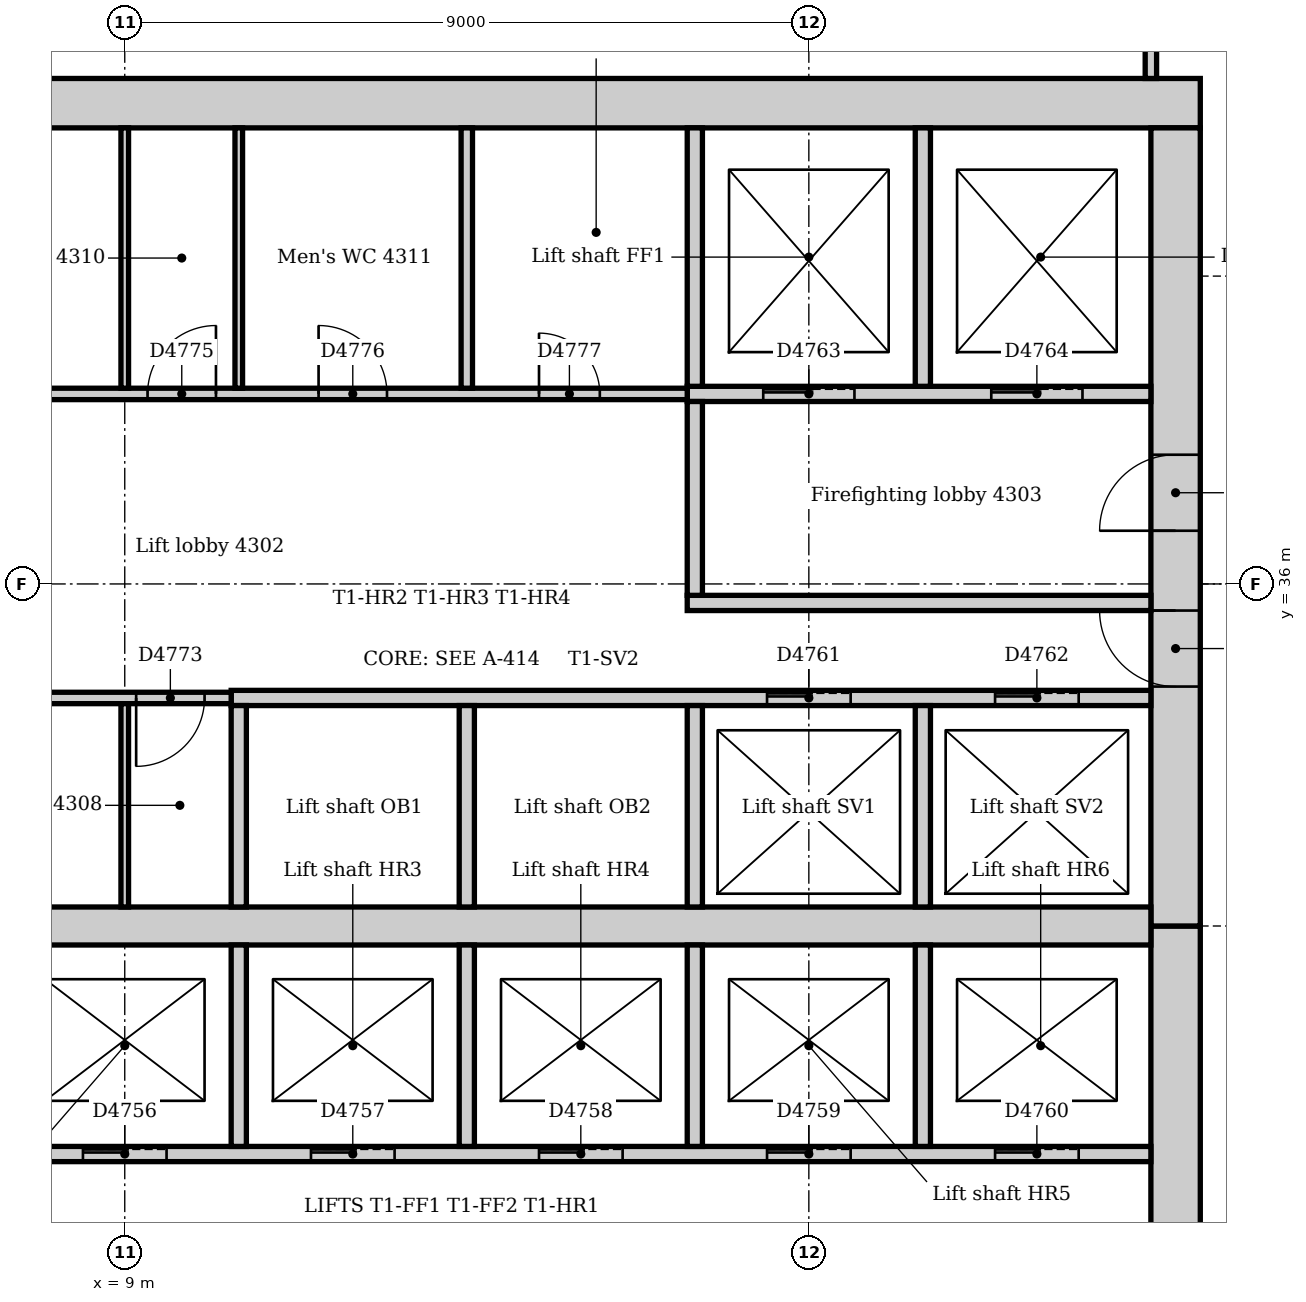
"""IFC4 building model, lengths in metres.
Left out: names, types, materials, properties, quantities, classifications, styles, units other than length and angle.
Written with IfcOpenShell. Run it as: python <this file> out.ifc"""

import sys

from ifc_helpers import new_model, si_unit, direction, frame, frame_2d, origin, place, context, subcontext, project, spatial, rectangle, extrude, element, fill, save


model = new_model("IFC4")
c1 = context("Model", 3, precision=1e-05, world=origin(), true_north=direction((0.0, 1.0)))
c2 = subcontext(c1, "Body", "Model", "MODEL_VIEW")
j1 = project(units=[si_unit("LENGTHUNIT", "METRE"), si_unit("PLANEANGLEUNIT", "RADIAN")], contexts=[c1])
p1 = place(None, origin())
s1 = spatial("IfcSite", under=j1, at=p1, CompositionType="ELEMENT")
p2 = place(p1, origin())
s2 = spatial("IfcBuilding", under=s1, at=p2, CompositionType="ELEMENT")
p3 = place(p2, frame((0.0, 0.0, 181.0)))
s3 = spatial("IfcBuildingStorey", under=s2, at=p3, CompositionType="ELEMENT", Elevation=181.0)
p4 = place(p3, frame((23.15, 42.325, 0.0), z_axis=(0.0, 0.0, 1.0), x_axis=(-1.0, 0.0, 0.0)))
e1 = element("IfcWall", 1, at=p4, inside=s3, PredefinedType="SOLIDWALL", context=c2, shape_type="SweptSolid", body=[
    extrude(rectangle(XDim=19.25, YDim=0.65, at=frame_2d((9.625, 0.0))), origin(), (0.0, 0.0, 1.0), 4.0),
])
p5 = place(p3, frame((22.825, 21.0, 0.0), z_axis=(0.0, 0.0, 1.0), x_axis=(0.0, 1.0, 0.0)))
e2 = element("IfcWall", 2, at=p5, inside=s3, PredefinedType="SOLIDWALL", context=c2, shape_type="SweptSolid", body=[
    extrude(rectangle(XDim=10.5, YDim=0.65, at=frame_2d((5.25, 0.0))), origin(), (0.0, 0.0, 1.0), 4.0),
])
p6 = place(p5, frame((4.35, 0.0, 0.0)))
e3 = element("IfcOpeningElement", 3, at=p6, cuts=e2, PredefinedType="OPENING", context=c2, shape_type="SweptSolid", body=[
    extrude(rectangle(XDim=1.8, YDim=2.1, at=frame_2d((0.9, 1.05))), frame((0.0, 0.335, 0.0), z_axis=(0.0, -1.0, 0.0), x_axis=(1.0, 0.0, 0.0)), (0.0, 0.0, 1.0), 0.67),
])
p7 = place(p3, frame((22.825, 31.5, 0.0), z_axis=(0.0, 0.0, 1.0), x_axis=(0.0, 1.0, 0.0)))
e4 = element("IfcWall", 4, at=p7, inside=s3, PredefinedType="SOLIDWALL", context=c2, shape_type="SweptSolid", body=[
    extrude(rectangle(XDim=10.5, YDim=0.65, at=frame_2d((5.25, 0.0))), origin(), (0.0, 0.0, 1.0), 4.0),
])
p8 = place(p7, frame((3.15, 0.0, 0.0)))
e5 = element("IfcOpeningElement", 5, at=p8, cuts=e4, PredefinedType="OPENING", context=c2, shape_type="SweptSolid", body=[
    extrude(rectangle(XDim=1.0, YDim=2.1, at=frame_2d((0.5, 1.05))), frame((0.0, 0.335, 0.0), z_axis=(0.0, -1.0, 0.0), x_axis=(1.0, 0.0, 0.0)), (0.0, 0.0, 1.0), 0.67),
])
p9 = place(p7, frame((5.2, 0.0, 0.0)))
e6 = element("IfcOpeningElement", 6, at=p9, cuts=e4, PredefinedType="OPENING", context=c2, shape_type="SweptSolid", body=[
    extrude(rectangle(XDim=1.0, YDim=2.1, at=frame_2d((0.5, 1.05))), frame((0.0, 0.335, 0.0), z_axis=(0.0, -1.0, 0.0), x_axis=(1.0, 0.0, 0.0)), (0.0, 0.0, 1.0), 0.67),
])
p10 = place(p3, frame((4.5, 31.5, 0.0), z_axis=(0.0, 0.0, 1.0), x_axis=(1.0, 0.0, 0.0)))
e7 = element("IfcWall", 7, at=p10, inside=s3, PredefinedType="SOLIDWALL", context=c2, shape_type="SweptSolid", body=[
    extrude(rectangle(XDim=18.0, YDim=0.5, at=frame_2d((9.0, 0.0))), origin(), (0.0, 0.0, 1.0), 4.0),
])
p11 = place(p3, frame((16.4, 35.75, 0.0), z_axis=(0.0, 0.0, 1.0), x_axis=(1.0, 0.0, 0.0)))
e8 = element("IfcWall", 8, at=p11, inside=s3, PredefinedType="PARTITIONING", context=c2, shape_type="SweptSolid", body=[
    extrude(rectangle(XDim=6.1, YDim=0.2, at=frame_2d((3.05, 0.0))), origin(), (0.0, 0.0, 1.0), 3.85),
])
p12 = place(p3, frame((16.4, 38.5, 0.0), z_axis=(0.0, 0.0, 1.0), x_axis=(1.0, 0.0, 0.0)))
e9 = element("IfcWall", 9, at=p12, inside=s3, PredefinedType="PARTITIONING", context=c2, shape_type="SweptSolid", body=[
    extrude(rectangle(XDim=6.1, YDim=0.2, at=frame_2d((3.05, 0.0))), origin(), (0.0, 0.0, 1.0), 3.85),
])
p13 = place(p12, frame((1.0, 0.0, 0.0)))
e10 = element("IfcOpeningElement", 10, at=p13, cuts=e9, PredefinedType="OPENING", context=c2, shape_type="SweptSolid", body=[
    extrude(rectangle(XDim=1.2, YDim=2.1, at=frame_2d((0.6, 1.05))), frame((0.0, 0.11, 0.0), z_axis=(0.0, -1.0, 0.0), x_axis=(1.0, 0.0, 0.0)), (0.0, 0.0, 1.0), 0.22),
])
p14 = place(p12, frame((4.0, 0.0, 0.0)))
e11 = element("IfcOpeningElement", 11, at=p14, cuts=e9, PredefinedType="OPENING", context=c2, shape_type="SweptSolid", body=[
    extrude(rectangle(XDim=1.2, YDim=2.1, at=frame_2d((0.6, 1.05))), frame((0.0, 0.11, 0.0), z_axis=(0.0, -1.0, 0.0), x_axis=(1.0, 0.0, 0.0)), (0.0, 0.0, 1.0), 0.22),
])
p15 = place(p3, frame((16.5, 35.85, 0.0), z_axis=(0.0, 0.0, 1.0), x_axis=(0.0, 1.0, 0.0)))
e12 = element("IfcWall", 12, at=p15, inside=s3, PredefinedType="PARTITIONING", context=c2, shape_type="SweptSolid", body=[
    extrude(rectangle(XDim=2.55, YDim=0.2, at=frame_2d((1.275, 0.0))), origin(), (0.0, 0.0, 1.0), 3.85),
])
p16 = place(p3, frame((4.5, 28.5, 0.0), z_axis=(0.0, 0.0, 1.0), x_axis=(1.0, 0.0, 0.0)))
e13 = element("IfcWall", 13, at=p16, inside=s3, PredefinedType="PARTITIONING", context=c2, shape_type="SweptSolid", body=[
    extrude(rectangle(XDim=18.0, YDim=0.2, at=frame_2d((9.0, 0.0))), origin(), (0.0, 0.0, 1.0), 3.85),
])
p17 = place(p16, frame((0.95, 0.0, 0.0)))
e14 = element("IfcOpeningElement", 14, at=p17, cuts=e13, PredefinedType="OPENING", context=c2, shape_type="SweptSolid", body=[
    extrude(rectangle(XDim=1.1, YDim=2.1, at=frame_2d((0.55, 1.05))), frame((0.0, 0.11, 0.0), z_axis=(0.0, -1.0, 0.0), x_axis=(1.0, 0.0, 0.0)), (0.0, 0.0, 1.0), 0.22),
])
p18 = place(p16, frame((3.95, 0.0, 0.0)))
e15 = element("IfcOpeningElement", 15, at=p18, cuts=e13, PredefinedType="OPENING", context=c2, shape_type="SweptSolid", body=[
    extrude(rectangle(XDim=1.1, YDim=2.1, at=frame_2d((0.55, 1.05))), frame((0.0, 0.11, 0.0), z_axis=(0.0, -1.0, 0.0), x_axis=(1.0, 0.0, 0.0)), (0.0, 0.0, 1.0), 0.22),
])
p19 = place(p16, frame((6.95, 0.0, 0.0)))
e16 = element("IfcOpeningElement", 16, at=p19, cuts=e13, PredefinedType="OPENING", context=c2, shape_type="SweptSolid", body=[
    extrude(rectangle(XDim=1.1, YDim=2.1, at=frame_2d((0.55, 1.05))), frame((0.0, 0.11, 0.0), z_axis=(0.0, -1.0, 0.0), x_axis=(1.0, 0.0, 0.0)), (0.0, 0.0, 1.0), 0.22),
])
p20 = place(p16, frame((9.95, 0.0, 0.0)))
e17 = element("IfcOpeningElement", 17, at=p20, cuts=e13, PredefinedType="OPENING", context=c2, shape_type="SweptSolid", body=[
    extrude(rectangle(XDim=1.1, YDim=2.1, at=frame_2d((0.55, 1.05))), frame((0.0, 0.11, 0.0), z_axis=(0.0, -1.0, 0.0), x_axis=(1.0, 0.0, 0.0)), (0.0, 0.0, 1.0), 0.22),
])
p21 = place(p16, frame((12.95, 0.0, 0.0)))
e18 = element("IfcOpeningElement", 18, at=p21, cuts=e13, PredefinedType="OPENING", context=c2, shape_type="SweptSolid", body=[
    extrude(rectangle(XDim=1.1, YDim=2.1, at=frame_2d((0.55, 1.05))), frame((0.0, 0.11, 0.0), z_axis=(0.0, -1.0, 0.0), x_axis=(1.0, 0.0, 0.0)), (0.0, 0.0, 1.0), 0.22),
])
p22 = place(p16, frame((15.95, 0.0, 0.0)))
e19 = element("IfcOpeningElement", 19, at=p22, cuts=e13, PredefinedType="OPENING", context=c2, shape_type="SweptSolid", body=[
    extrude(rectangle(XDim=1.1, YDim=2.1, at=frame_2d((0.55, 1.05))), frame((0.0, 0.11, 0.0), z_axis=(0.0, -1.0, 0.0), x_axis=(1.0, 0.0, 0.0)), (0.0, 0.0, 1.0), 0.22),
])
p23 = place(p3, frame((10.4, 34.5, 0.0), z_axis=(0.0, 0.0, 1.0), x_axis=(1.0, 0.0, 0.0)))
e20 = element("IfcWall", 20, at=p23, inside=s3, PredefinedType="PARTITIONING", context=c2, shape_type="SweptSolid", body=[
    extrude(rectangle(XDim=12.1, YDim=0.2, at=frame_2d((6.05, 0.0))), origin(), (0.0, 0.0, 1.0), 3.85),
])
p24 = place(p23, frame((7.05, 0.0, 0.0)))
e21 = element("IfcOpeningElement", 21, at=p24, cuts=e20, PredefinedType="OPENING", context=c2, shape_type="SweptSolid", body=[
    extrude(rectangle(XDim=1.1, YDim=2.1, at=frame_2d((0.55, 1.05))), frame((0.0, 0.11, 0.0), z_axis=(0.0, -1.0, 0.0), x_axis=(1.0, 0.0, 0.0)), (0.0, 0.0, 1.0), 0.22),
])
p25 = place(p23, frame((10.05, 0.0, 0.0)))
e22 = element("IfcOpeningElement", 22, at=p25, cuts=e20, PredefinedType="OPENING", context=c2, shape_type="SweptSolid", body=[
    extrude(rectangle(XDim=1.1, YDim=2.1, at=frame_2d((0.55, 1.05))), frame((0.0, 0.11, 0.0), z_axis=(0.0, -1.0, 0.0), x_axis=(1.0, 0.0, 0.0)), (0.0, 0.0, 1.0), 0.22),
])
for number, where, z_axis, x_axis in (
    (23, (10.5, 28.6, 0.0), (0.0, 0.0, 1.0), (0.0, 1.0, 0.0)),
    (24, (10.5, 31.75, 0.0), (0.0, 0.0, 1.0), (0.0, 1.0, 0.0)),
    (25, (13.5, 28.6, 0.0), (0.0, 0.0, 1.0), (0.0, 1.0, 0.0)),
    (26, (13.5, 31.75, 0.0), (0.0, 0.0, 1.0), (0.0, 1.0, 0.0)),
    (27, (16.5, 28.6, 0.0), (0.0, 0.0, 1.0), (0.0, 1.0, 0.0)),
    (28, (16.5, 31.75, 0.0), (0.0, 0.0, 1.0), (0.0, 1.0, 0.0)),
    (29, (19.5, 28.6, 0.0), (0.0, 0.0, 1.0), (0.0, 1.0, 0.0)),
    (30, (19.5, 31.75, 0.0), (0.0, 0.0, 1.0), (0.0, 1.0, 0.0)),
):
    element("IfcWall", number, at=place(p3, frame(where, z_axis=z_axis, x_axis=x_axis)), inside=s3, PredefinedType="PARTITIONING", context=c2, shape_type="SweptSolid", body=[
        extrude(rectangle(XDim=2.65, YDim=0.2, at=frame_2d((1.325, 0.0))), origin(), (0.0, 0.0, 1.0), 3.85),
    ])
for number, where, z_axis, x_axis in (
    (31, (16.5, 38.6, 0.0), (0.0, 0.0, 1.0), (0.0, 1.0, 0.0)),
    (32, (19.5, 38.6, 0.0), (0.0, 0.0, 1.0), (0.0, 1.0, 0.0)),
):
    element("IfcWall", number, at=place(p3, frame(where, z_axis=z_axis, x_axis=x_axis)), inside=s3, PredefinedType="PARTITIONING", context=c2, shape_type="SweptSolid", body=[
        extrude(rectangle(XDim=3.4, YDim=0.2, at=frame_2d((1.7, 0.0))), origin(), (0.0, 0.0, 1.0), 3.85),
    ])
p26 = place(p3, frame((4.5, 38.5, 0.0), z_axis=(0.0, 0.0, 1.0), x_axis=(1.0, 0.0, 0.0)))
e33 = element("IfcWall", 33, at=p26, inside=s3, PredefinedType="PARTITIONING", context=c2, shape_type="SweptSolid", body=[
    extrude(rectangle(XDim=11.9, YDim=0.15, at=frame_2d((5.95, 0.0))), origin(), (0.0, 0.0, 1.0), 3.85),
])
p27 = place(p26, frame((1.85, 0.0, 0.0)))
e34 = element("IfcOpeningElement", 34, at=p27, cuts=e33, PredefinedType="OPENING", context=c2, shape_type="SweptSolid", body=[
    extrude(rectangle(XDim=0.9, YDim=2.1, at=frame_2d((0.45, 1.05))), frame((0.0, 0.085, 0.0), z_axis=(0.0, -1.0, 0.0), x_axis=(1.0, 0.0, 0.0)), (0.0, 0.0, 1.0), 0.17),
])
p28 = place(p26, frame((4.8, 0.0, 0.0)))
e35 = element("IfcOpeningElement", 35, at=p28, cuts=e33, PredefinedType="OPENING", context=c2, shape_type="SweptSolid", body=[
    extrude(rectangle(XDim=0.9, YDim=2.1, at=frame_2d((0.45, 1.05))), frame((0.0, 0.085, 0.0), z_axis=(0.0, -1.0, 0.0), x_axis=(1.0, 0.0, 0.0)), (0.0, 0.0, 1.0), 0.17),
])
p29 = place(p26, frame((7.05, 0.0, 0.0)))
e36 = element("IfcOpeningElement", 36, at=p29, cuts=e33, PredefinedType="OPENING", context=c2, shape_type="SweptSolid", body=[
    extrude(rectangle(XDim=0.9, YDim=2.1, at=frame_2d((0.45, 1.05))), frame((0.0, 0.085, 0.0), z_axis=(0.0, -1.0, 0.0), x_axis=(1.0, 0.0, 0.0)), (0.0, 0.0, 1.0), 0.17),
])
p30 = place(p26, frame((9.95, 0.0, 0.0)))
e37 = element("IfcOpeningElement", 37, at=p30, cuts=e33, PredefinedType="OPENING", context=c2, shape_type="SweptSolid", body=[
    extrude(rectangle(XDim=0.8, YDim=2.1, at=frame_2d((0.4, 1.05))), frame((0.0, 0.085, 0.0), z_axis=(0.0, -1.0, 0.0), x_axis=(1.0, 0.0, 0.0)), (0.0, 0.0, 1.0), 0.17),
])
p31 = place(p3, frame((4.5, 34.5, 0.0), z_axis=(0.0, 0.0, 1.0), x_axis=(1.0, 0.0, 0.0)))
e38 = element("IfcWall", 38, at=p31, inside=s3, PredefinedType="PARTITIONING", context=c2, shape_type="SweptSolid", body=[
    extrude(rectangle(XDim=5.9, YDim=0.15, at=frame_2d((2.95, 0.0))), origin(), (0.0, 0.0, 1.0), 3.85),
])
p32 = place(p31, frame((1.85, 0.0, 0.0)))
e39 = element("IfcOpeningElement", 39, at=p32, cuts=e38, PredefinedType="OPENING", context=c2, shape_type="SweptSolid", body=[
    extrude(rectangle(XDim=0.9, YDim=2.1, at=frame_2d((0.45, 1.05))), frame((0.0, 0.085, 0.0), z_axis=(0.0, -1.0, 0.0), x_axis=(1.0, 0.0, 0.0)), (0.0, 0.0, 1.0), 0.17),
])
p33 = place(p31, frame((4.65, 0.0, 0.0)))
e40 = element("IfcOpeningElement", 40, at=p33, cuts=e38, PredefinedType="OPENING", context=c2, shape_type="SweptSolid", body=[
    extrude(rectangle(XDim=0.9, YDim=2.1, at=frame_2d((0.45, 1.05))), frame((0.0, 0.085, 0.0), z_axis=(0.0, -1.0, 0.0), x_axis=(1.0, 0.0, 0.0)), (0.0, 0.0, 1.0), 0.17),
])
p34 = place(p3, frame((22.5, 42.65, 0.0), z_axis=(0.0, 0.0, 1.0), x_axis=(0.0, 1.0, 0.0)))
e41 = element("IfcWall", 41, at=p34, inside=s3, PredefinedType="PARTITIONING", context=c2, shape_type="SweptSolid", body=[
    extrude(rectangle(XDim=1.825, YDim=0.15, at=frame_2d((0.912, 0.0))), origin(), (0.0, 0.0, 1.0), 3.85),
])
p35 = place(p3, frame((13.5, 38.575, 0.0), z_axis=(0.0, 0.0, 1.0), x_axis=(0.0, 1.0, 0.0)))
e42 = element("IfcWall", 42, at=p35, inside=s3, PredefinedType="PARTITIONING", context=c2, shape_type="SweptSolid", body=[
    extrude(rectangle(XDim=3.425, YDim=0.15, at=frame_2d((1.712, 0.0))), origin(), (0.0, 0.0, 1.0), 3.85),
])
for number, where, z_axis, x_axis in (
    (43, (9.0, 38.575, 0.0), (0.0, 0.0, 1.0), (0.0, 1.0, 0.0)),
    (44, (10.5, 38.575, 0.0), (0.0, 0.0, 1.0), (0.0, 1.0, 0.0)),
):
    element("IfcWall", number, at=place(p3, frame(where, z_axis=z_axis, x_axis=x_axis)), inside=s3, PredefinedType="PARTITIONING", context=c2, shape_type="SweptSolid", body=[
        extrude(rectangle(XDim=3.425, YDim=0.1, at=frame_2d((1.712, 0.0))), origin(), (0.0, 0.0, 1.0), 3.85),
    ])
p36 = place(p3, frame((9.0, 31.75, 0.0), z_axis=(0.0, 0.0, 1.0), x_axis=(0.0, 1.0, 0.0)))
e45 = element("IfcWall", 45, at=p36, inside=s3, PredefinedType="PARTITIONING", context=c2, shape_type="SweptSolid", body=[
    extrude(rectangle(XDim=2.675, YDim=0.1, at=frame_2d((1.337, 0.0))), origin(), (0.0, 0.0, 1.0), 3.85),
])
p37 = place(p18, origin())
e46 = element("IfcDoor", 46, at=p37, inside=s3, OperationType="SLIDING_TO_LEFT", PredefinedType="DOOR", context=c2, shape_type="SweptSolid", body=[
    extrude(rectangle(XDim=1.1, YDim=2.1, at=frame_2d((0.55, 1.05))), frame((0.0, 0.025, 0.0), z_axis=(0.0, -1.0, 0.0), x_axis=(1.0, 0.0, 0.0)), (0.0, 0.0, 1.0), 0.05),
])
fill(e15, e46)
p38 = place(p19, origin())
e47 = element("IfcDoor", 47, at=p38, inside=s3, OperationType="SLIDING_TO_LEFT", PredefinedType="DOOR", context=c2, shape_type="SweptSolid", body=[
    extrude(rectangle(XDim=1.1, YDim=2.1, at=frame_2d((0.55, 1.05))), frame((0.0, 0.025, 0.0), z_axis=(0.0, -1.0, 0.0), x_axis=(1.0, 0.0, 0.0)), (0.0, 0.0, 1.0), 0.05),
])
fill(e16, e47)
p39 = place(p20, origin())
e48 = element("IfcDoor", 48, at=p39, inside=s3, OperationType="SLIDING_TO_LEFT", PredefinedType="DOOR", context=c2, shape_type="SweptSolid", body=[
    extrude(rectangle(XDim=1.1, YDim=2.1, at=frame_2d((0.55, 1.05))), frame((0.0, 0.025, 0.0), z_axis=(0.0, -1.0, 0.0), x_axis=(1.0, 0.0, 0.0)), (0.0, 0.0, 1.0), 0.05),
])
fill(e17, e48)
p40 = place(p21, origin())
e49 = element("IfcDoor", 49, at=p40, inside=s3, OperationType="SLIDING_TO_LEFT", PredefinedType="DOOR", context=c2, shape_type="SweptSolid", body=[
    extrude(rectangle(XDim=1.1, YDim=2.1, at=frame_2d((0.55, 1.05))), frame((0.0, 0.025, 0.0), z_axis=(0.0, -1.0, 0.0), x_axis=(1.0, 0.0, 0.0)), (0.0, 0.0, 1.0), 0.05),
])
fill(e18, e49)
p41 = place(p22, origin())
e50 = element("IfcDoor", 50, at=p41, inside=s3, OperationType="SLIDING_TO_LEFT", PredefinedType="DOOR", context=c2, shape_type="SweptSolid", body=[
    extrude(rectangle(XDim=1.1, YDim=2.1, at=frame_2d((0.55, 1.05))), frame((0.0, 0.025, 0.0), z_axis=(0.0, -1.0, 0.0), x_axis=(1.0, 0.0, 0.0)), (0.0, 0.0, 1.0), 0.05),
])
fill(e19, e50)
p42 = place(p24, origin())
e51 = element("IfcDoor", 51, at=p42, inside=s3, OperationType="SLIDING_TO_LEFT", PredefinedType="DOOR", context=c2, shape_type="SweptSolid", body=[
    extrude(rectangle(XDim=1.1, YDim=2.1, at=frame_2d((0.55, 1.05))), frame((0.0, 0.025, 0.0), z_axis=(0.0, -1.0, 0.0), x_axis=(1.0, 0.0, 0.0)), (0.0, 0.0, 1.0), 0.05),
])
fill(e21, e51)
p43 = place(p25, origin())
e52 = element("IfcDoor", 52, at=p43, inside=s3, OperationType="SLIDING_TO_LEFT", PredefinedType="DOOR", context=c2, shape_type="SweptSolid", body=[
    extrude(rectangle(XDim=1.1, YDim=2.1, at=frame_2d((0.55, 1.05))), frame((0.0, 0.025, 0.0), z_axis=(0.0, -1.0, 0.0), x_axis=(1.0, 0.0, 0.0)), (0.0, 0.0, 1.0), 0.05),
])
fill(e22, e52)
p44 = place(p13, origin())
e53 = element("IfcDoor", 53, at=p44, inside=s3, OperationType="SLIDING_TO_LEFT", PredefinedType="DOOR", context=c2, shape_type="SweptSolid", body=[
    extrude(rectangle(XDim=1.2, YDim=2.1, at=frame_2d((0.6, 1.05))), frame((0.0, 0.025, 0.0), z_axis=(0.0, -1.0, 0.0), x_axis=(1.0, 0.0, 0.0)), (0.0, 0.0, 1.0), 0.05),
])
fill(e10, e53)
p45 = place(p14, origin())
e54 = element("IfcDoor", 54, at=p45, inside=s3, OperationType="SLIDING_TO_LEFT", PredefinedType="DOOR", context=c2, shape_type="SweptSolid", body=[
    extrude(rectangle(XDim=1.2, YDim=2.1, at=frame_2d((0.6, 1.05))), frame((0.0, 0.025, 0.0), z_axis=(0.0, -1.0, 0.0), x_axis=(1.0, 0.0, 0.0)), (0.0, 0.0, 1.0), 0.05),
])
fill(e11, e54)
p46 = place(p8, origin())
e55 = element("IfcDoor", 55, at=p46, inside=s3, OperationType="SINGLE_SWING_RIGHT", PredefinedType="DOOR", context=c2, shape_type="SweptSolid", body=[
    extrude(rectangle(XDim=1.0, YDim=2.1, at=frame_2d((0.5, 1.05))), frame((0.0, 0.025, 0.0), z_axis=(0.0, -1.0, 0.0), x_axis=(1.0, 0.0, 0.0)), (0.0, 0.0, 1.0), 0.05),
])
fill(e5, e55)
p47 = place(p9, origin())
e56 = element("IfcDoor", 56, at=p47, inside=s3, OperationType="SINGLE_SWING_LEFT", PredefinedType="DOOR", context=c2, shape_type="SweptSolid", body=[
    extrude(rectangle(XDim=1.0, YDim=2.1, at=frame_2d((0.5, 1.05))), frame((0.0, 0.025, 0.0), z_axis=(0.0, -1.0, 0.0), x_axis=(1.0, 0.0, 0.0)), (0.0, 0.0, 1.0), 0.05),
])
fill(e6, e56)
p48 = place(p33, frame((0.9, 0.0, 0.0), z_axis=(0.0, 0.0, 1.0), x_axis=(-1.0, 0.0, 0.0)))
e57 = element("IfcDoor", 57, at=p48, inside=s3, OperationType="SINGLE_SWING_RIGHT", PredefinedType="DOOR", context=c2, shape_type="SweptSolid", body=[
    extrude(rectangle(XDim=0.9, YDim=2.1, at=frame_2d((0.45, 1.05))), frame((0.0, 0.025, 0.0), z_axis=(0.0, -1.0, 0.0), x_axis=(1.0, 0.0, 0.0)), (0.0, 0.0, 1.0), 0.05),
])
fill(e40, e57)
p49 = place(p28, origin())
e58 = element("IfcDoor", 58, at=p49, inside=s3, OperationType="SINGLE_SWING_RIGHT", PredefinedType="DOOR", context=c2, shape_type="SweptSolid", body=[
    extrude(rectangle(XDim=0.9, YDim=2.1, at=frame_2d((0.45, 1.05))), frame((0.0, 0.025, 0.0), z_axis=(0.0, -1.0, 0.0), x_axis=(1.0, 0.0, 0.0)), (0.0, 0.0, 1.0), 0.05),
])
fill(e35, e58)
p50 = place(p29, origin())
e59 = element("IfcDoor", 59, at=p50, inside=s3, OperationType="SINGLE_SWING_LEFT", PredefinedType="DOOR", context=c2, shape_type="SweptSolid", body=[
    extrude(rectangle(XDim=0.9, YDim=2.1, at=frame_2d((0.45, 1.05))), frame((0.0, 0.025, 0.0), z_axis=(0.0, -1.0, 0.0), x_axis=(1.0, 0.0, 0.0)), (0.0, 0.0, 1.0), 0.05),
])
fill(e36, e59)
p51 = place(p30, origin())
e60 = element("IfcDoor", 60, at=p51, inside=s3, OperationType="SINGLE_SWING_LEFT", PredefinedType="DOOR", context=c2, shape_type="SweptSolid", body=[
    extrude(rectangle(XDim=0.8, YDim=2.1, at=frame_2d((0.4, 1.05))), frame((0.0, 0.025, 0.0), z_axis=(0.0, -1.0, 0.0), x_axis=(1.0, 0.0, 0.0)), (0.0, 0.0, 1.0), 0.05),
])
fill(e37, e60)
save(model, sys.argv[1])
